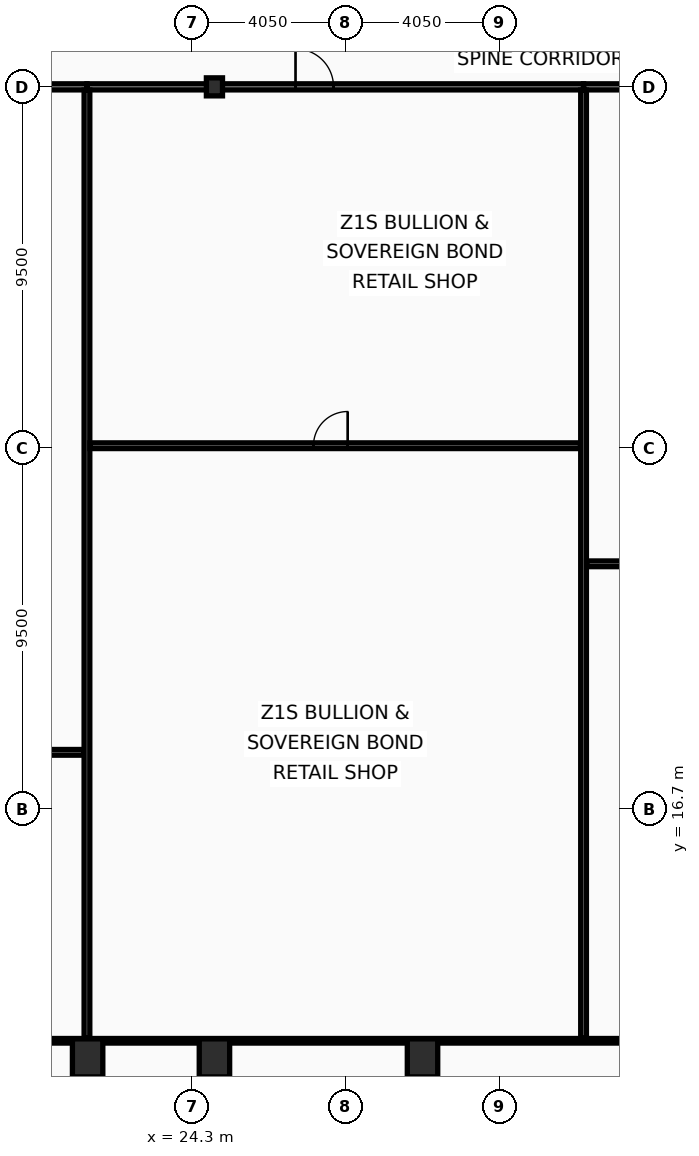
"""IFC4 building model, lengths in metres.
Left out: names, types, materials, properties, quantities, classifications, styles, units other than length and angle.
Written with IfcOpenShell. Run it as: python <this file> out.ifc"""

import sys

from ifc_helpers import new_model, si_unit, direction, frame, frame_2d, origin, origin_2d, place, context, subcontext, project, spatial, rectangle, hollow_rectangle, i_section, extrude, element, fill, save


model = new_model("IFC4")
c1 = context("Model", 3, precision=1e-05, world=origin(), true_north=direction((0.0, 1.0)))
c2 = subcontext(c1, "Body", "Model", "MODEL_VIEW")
j1 = project(units=[si_unit("LENGTHUNIT", "METRE"), si_unit("PLANEANGLEUNIT", "RADIAN")], contexts=[c1])
p1 = place(None, origin())
s1 = spatial("IfcSite", under=j1, at=p1, CompositionType="ELEMENT")
p2 = place(p1, origin())
s2 = spatial("IfcBuilding", under=s1, at=p2, CompositionType="ELEMENT")
p3 = place(p2, frame((0.0, 0.0, 53.8)))
s3 = spatial("IfcBuildingStorey", under=s2, at=p3, CompositionType="ELEMENT", Elevation=53.8)
for number, where, z_axis, x_axis in (
    (1, (21.562, 10.15, 0.0), (0.0, 0.0, 1.0), (1.0, 0.0, 0.0)),
    (2, (24.9, 10.15, 0.0), (0.0, 0.0, 1.0), (1.0, 0.0, 0.0)),
    (3, (30.375, 10.15, 0.0), (0.0, 0.0, 1.0), (1.0, 0.0, 0.0)),
):
    element("IfcColumn", number, at=place(p3, frame(where, z_axis=z_axis, x_axis=x_axis)), inside=s3, PredefinedType="COLUMN", context=c2, shape_type="SweptSolid", body=[
        extrude(hollow_rectangle(XDim=0.8, YDim=1.0, WallThickness=0.055, at=origin_2d()), origin(), (0.0, 0.0, 1.0), 4.0),
    ])
p4 = place(p3, frame((24.9, 35.7, 0.0), z_axis=(0.0, 0.0, 1.0), x_axis=(1.0, 0.0, 0.0)))
e4 = element("IfcColumn", 4, at=p4, inside=s3, PredefinedType="COLUMN", context=c2, shape_type="SweptSolid", body=[
    extrude(i_section(OverallWidth=0.424, OverallDepth=0.474, WebThickness=0.048, FlangeThickness=0.077, at=origin_2d()), origin(), (0.0, 0.0, 1.0), 4.0),
])
p5 = place(p3, frame((2.03, 35.7, 0.0), z_axis=(0.0, 0.0, 1.0), x_axis=(1.0, 0.0, 0.0)))
e5 = element("IfcWall", 5, at=p5, inside=s3, PredefinedType="PARTITIONING", context=c2, shape_type="SweptSolid", body=[
    extrude(rectangle(XDim=19.515, YDim=0.16, at=frame_2d((9.758, 0.0))), origin(), (0.0, 0.0, 1.0), 3.01),
])
p6 = place(p5, frame((8.196, 0.0, 0.0)))
e6 = element("IfcOpeningElement", 6, at=p6, cuts=e5, PredefinedType="OPENING", context=c2, shape_type="SweptSolid", body=[
    extrude(rectangle(XDim=1.6, YDim=2.15, at=frame_2d((0.8, 1.075))), frame((0.0, 0.09, 0.0), z_axis=(0.0, -1.0, 0.0), x_axis=(1.0, 0.0, 0.0)), (0.0, 0.0, 1.0), 0.18),
])
p7 = place(p3, frame((2.095, 18.19, 0.0), z_axis=(0.0, 0.0, 1.0), x_axis=(1.0, 0.0, 0.0)))
e7 = element("IfcWall", 7, at=p7, inside=s3, PredefinedType="PARTITIONING", context=c2, shape_type="SweptSolid", body=[
    extrude(rectangle(XDim=19.37, YDim=0.15, at=frame_2d((9.685, 0.0))), origin(), (0.0, 0.0, 1.0), 3.01),
])
p8 = place(p7, frame((8.782, 0.0, 0.0)))
e8 = element("IfcOpeningElement", 8, at=p8, cuts=e7, PredefinedType="OPENING", context=c2, shape_type="SweptSolid", body=[
    extrude(rectangle(XDim=0.9, YDim=2.05, at=frame_2d((0.45, 1.025))), frame((0.0, 0.085, 0.0), z_axis=(0.0, -1.0, 0.0), x_axis=(1.0, 0.0, 0.0)), (0.0, 0.0, 1.0), 0.17),
])
p9 = place(p3, frame((21.545, 35.7, 0.0), z_axis=(0.0, 0.0, 1.0), x_axis=(1.0, 0.0, 0.0)))
e9 = element("IfcWall", 9, at=p9, inside=s3, PredefinedType="PARTITIONING", context=c2, shape_type="SweptSolid", body=[
    extrude(rectangle(XDim=13.068, YDim=0.16, at=frame_2d((6.534, 0.0))), origin(), (0.0, 0.0, 1.0), 3.01),
])
p10 = place(p9, frame((5.489, 0.0, 0.0)))
e10 = element("IfcOpeningElement", 10, at=p10, cuts=e9, PredefinedType="OPENING", context=c2, shape_type="SweptSolid", body=[
    extrude(rectangle(XDim=1.0, YDim=2.05, at=frame_2d((0.5, 1.025))), frame((0.0, 0.09, 0.0), z_axis=(0.0, -1.0, 0.0), x_axis=(1.0, 0.0, 0.0)), (0.0, 0.0, 1.0), 0.18),
])
p11 = place(p3, frame((21.545, 10.665, 0.0), z_axis=(0.0, 0.0, 1.0), x_axis=(0.0, 1.0, 0.0)))
e11 = element("IfcWall", 11, at=p11, inside=s3, PredefinedType="PARTITIONING", context=c2, shape_type="SweptSolid", body=[
    extrude(rectangle(XDim=24.95, YDim=0.15, at=frame_2d((12.475, 0.0))), origin(), (0.0, 0.0, 1.0), 3.21),
])
p12 = place(p3, frame((21.625, 26.257, 0.0), z_axis=(0.0, 0.0, 1.0), x_axis=(1.0, 0.0, 0.0)))
e12 = element("IfcWall", 12, at=p12, inside=s3, PredefinedType="PARTITIONING", context=c2, shape_type="SweptSolid", body=[
    extrude(rectangle(XDim=12.908, YDim=0.15, at=frame_2d((6.454, 0.0))), origin(), (0.0, 0.0, 1.0), 3.01),
])
p13 = place(p12, frame((5.881, 0.0, 0.0)))
e13 = element("IfcOpeningElement", 13, at=p13, cuts=e12, PredefinedType="OPENING", context=c2, shape_type="SweptSolid", body=[
    extrude(rectangle(XDim=0.9, YDim=2.05, at=frame_2d((0.45, 1.025))), frame((0.0, 0.085, 0.0), z_axis=(0.0, -1.0, 0.0), x_axis=(1.0, 0.0, 0.0)), (0.0, 0.0, 1.0), 0.17),
])
p14 = place(p3, frame((34.613, 35.7, 0.0), z_axis=(0.0, 0.0, 1.0), x_axis=(1.0, 0.0, 0.0)))
e14 = element("IfcWall", 14, at=p14, inside=s3, PredefinedType="PARTITIONING", context=c2, shape_type="SweptSolid", body=[
    extrude(rectangle(XDim=18.106, YDim=0.16, at=frame_2d((9.053, 0.0))), origin(), (0.0, 0.0, 1.0), 3.01),
])
p15 = place(p14, frame((7.605, 0.0, 0.0)))
e15 = element("IfcOpeningElement", 15, at=p15, cuts=e14, PredefinedType="OPENING", context=c2, shape_type="SweptSolid", body=[
    extrude(rectangle(XDim=1.6, YDim=2.15, at=frame_2d((0.8, 1.075))), frame((0.0, 0.09, 0.0), z_axis=(0.0, -1.0, 0.0), x_axis=(1.0, 0.0, 0.0)), (0.0, 0.0, 1.0), 0.18),
])
p16 = place(p3, frame((34.613, 10.665, 0.0), z_axis=(0.0, 0.0, 1.0), x_axis=(0.0, 1.0, 0.0)))
e16 = element("IfcWall", 16, at=p16, inside=s3, PredefinedType="PARTITIONING", context=c2, shape_type="SweptSolid", body=[
    extrude(rectangle(XDim=24.95, YDim=0.15, at=frame_2d((12.475, 0.0))), origin(), (0.0, 0.0, 1.0), 3.21),
])
p17 = place(p3, frame((34.693, 23.15, 0.0), z_axis=(0.0, 0.0, 1.0), x_axis=(1.0, 0.0, 0.0)))
e17 = element("IfcWall", 17, at=p17, inside=s3, PredefinedType="PARTITIONING", context=c2, shape_type="SweptSolid", body=[
    extrude(rectangle(XDim=17.947, YDim=0.15, at=frame_2d((8.973, 0.0))), origin(), (0.0, 0.0, 1.0), 3.01),
])
p18 = place(p17, frame((8.148, 0.0, 0.0)))
e18 = element("IfcOpeningElement", 18, at=p18, cuts=e17, PredefinedType="OPENING", context=c2, shape_type="SweptSolid", body=[
    extrude(rectangle(XDim=0.9, YDim=2.05, at=frame_2d((0.45, 1.025))), frame((0.0, 0.085, 0.0), z_axis=(0.0, -1.0, 0.0), x_axis=(1.0, 0.0, 0.0)), (0.0, 0.0, 1.0), 0.17),
])
p19 = place(p3, frame((2.095, 10.6, 0.0), z_axis=(0.0, 0.0, 1.0), x_axis=(1.0, 0.0, 0.0)))
e19 = element("IfcWall", 19, at=p19, inside=s3, PredefinedType="PARTITIONING", context=c2, shape_type="SweptSolid", body=[
    extrude(rectangle(XDim=68.71, YDim=0.12, at=frame_2d((34.355, 0.0))), origin(), (0.0, 0.0, 1.0), 3.01),
])
p20 = place(p10, origin())
e20 = element("IfcDoor", 20, at=p20, inside=s3, OperationType="SINGLE_SWING_LEFT", PredefinedType="DOOR", context=c2, shape_type="SweptSolid", body=[
    extrude(rectangle(XDim=1.0, YDim=2.05, at=frame_2d((0.5, 1.025))), frame((0.0, 0.025, 0.0), z_axis=(0.0, -1.0, 0.0), x_axis=(1.0, 0.0, 0.0)), (0.0, 0.0, 1.0), 0.05),
])
fill(e10, e20)
p21 = place(p13, origin())
e21 = element("IfcDoor", 21, at=p21, inside=s3, OperationType="SINGLE_SWING_RIGHT", PredefinedType="DOOR", context=c2, shape_type="SweptSolid", body=[
    extrude(rectangle(XDim=0.9, YDim=2.05, at=frame_2d((0.45, 1.025))), frame((0.0, 0.025, 0.0), z_axis=(0.0, -1.0, 0.0), x_axis=(1.0, 0.0, 0.0)), (0.0, 0.0, 1.0), 0.05),
])
fill(e13, e21)
save(model, sys.argv[1])
